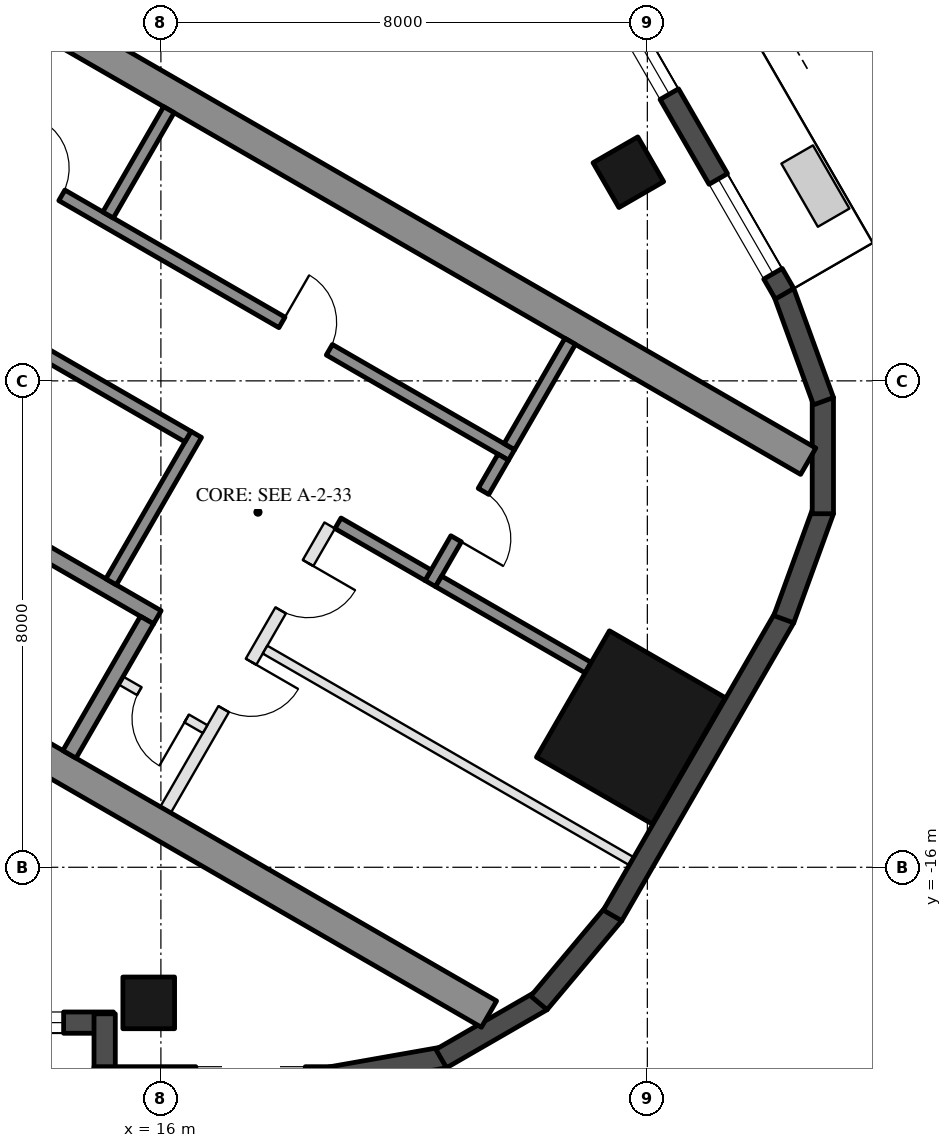
"""IFC4 building model, lengths in metres.
Left out: names, types, materials, properties, quantities, classifications, styles, units other than length and angle.
Written with IfcOpenShell. Run it as: python <this file> out.ifc"""

import sys

from ifc_helpers import new_model, si_unit, direction, frame, frame_2d, origin, origin_2d, place, context, subcontext, project, spatial, rectangle, hollow_rectangle, extrude, element, fill, save


model = new_model("IFC4")
c1 = context("Model", 3, precision=1e-05, world=origin(), true_north=direction((0.0, 1.0)))
c2 = subcontext(c1, "Body", "Model", "MODEL_VIEW")
j1 = project(units=[si_unit("LENGTHUNIT", "METRE"), si_unit("PLANEANGLEUNIT", "RADIAN")], contexts=[c1])
p1 = place(None, origin())
s1 = spatial("IfcSite", under=j1, at=p1, CompositionType="ELEMENT")
p2 = place(p1, origin())
s2 = spatial("IfcBuilding", under=s1, at=p2, CompositionType="ELEMENT")
p3 = place(p2, frame((0.0, 0.0, 146.6)))
s3 = spatial("IfcBuildingStorey", under=s2, at=p3, CompositionType="ELEMENT", Elevation=146.6)
for number, where, z_axis, x_axis in (
    (1, (15.8, -18.23, 0.0), (0.0, 0.0, 1.0), (-1.0, 0.0, 0.0)),
    (2, (23.688, -4.568, 0.0), (0.0, 0.0, 1.0), (-0.5, 0.866, 0.0)),
):
    element("IfcColumn", number, at=place(p3, frame(where, z_axis=z_axis, x_axis=x_axis)), inside=s3, PredefinedType="COLUMN", context=c2, shape_type="SweptSolid", body=[
        extrude(hollow_rectangle(XDim=0.85, YDim=0.85, WallThickness=0.04, at=origin_2d()), origin(), (0.0, 0.0, 1.0), 3.7),
    ])
p4 = place(p3, frame((23.729, -13.7, 0.0), z_axis=(0.0, 0.0, 1.0), x_axis=(0.5, 0.866025403784, 0.0)))
e3 = element("IfcColumn", 3, at=p4, inside=s3, PredefinedType="COLUMN", context=c2, shape_type="SweptSolid", body=[
    extrude(hollow_rectangle(XDim=2.4, YDim=2.2, WallThickness=0.06, at=origin_2d()), origin(), (0.0, 0.0, 1.0), 3.7),
])
p5 = place(p3, frame((8.48, -18.555, 0.0), z_axis=(0.0, 0.0, 1.0), x_axis=(1.0, 0.0, 0.0)))
e4 = element("IfcWall", 4, at=p5, inside=s3, PredefinedType="SOLIDWALL", context=c2, shape_type="SweptSolid", body=[
    extrude(rectangle(XDim=6.74, YDim=0.35, at=frame_2d((3.37, 0.0))), origin(), (0.0, 0.0, 1.0), 3.55),
])
p6 = place(p5, frame((0.32, 0.0, 0.0)))
e5 = element("IfcOpeningElement", 5, at=p6, cuts=e4, PredefinedType="OPENING", context=c2, shape_type="SweptSolid", body=[
    extrude(rectangle(XDim=2.4, YDim=2.4, at=frame_2d((1.2, 1.2))), frame((0.0, 0.185, 0.0), z_axis=(0.0, -1.0, 0.0), x_axis=(1.0, 0.0, 0.0)), (0.0, 0.0, 1.0), 0.37),
])
p7 = place(p5, frame((3.02, 0.0, 0.3)))
e6 = element("IfcOpeningElement", 6, at=p7, cuts=e4, PredefinedType="OPENING", context=c2, shape_type="SweptSolid", body=[
    extrude(rectangle(XDim=2.9, YDim=2.65, at=frame_2d((1.45, 1.325))), frame((0.0, 0.185, 0.0), z_axis=(0.0, -1.0, 0.0), x_axis=(1.0, 0.0, 0.0)), (0.0, 0.0, 1.0), 0.37),
])
p8 = place(p3, frame((15.075, -18.41, 0.0), z_axis=(0.0, 0.0, 1.0), x_axis=(0.0, -1.0, 0.0)))
e7 = element("IfcWall", 7, at=p8, inside=s3, PredefinedType="SOLIDWALL", context=c2, shape_type="SweptSolid", body=[
    extrude(rectangle(XDim=1.22, YDim=0.35, at=frame_2d((0.61, 0.0))), origin(), (0.0, 0.0, 1.0), 3.55),
])
p9 = place(p3, frame((14.9, -19.455, 0.0), z_axis=(0.0, 0.0, 1.0), x_axis=(1.0, 0.0, 0.0)))
e8 = element("IfcWall", 8, at=p9, inside=s3, PredefinedType="SOLIDWALL", context=c2, shape_type="SweptSolid", body=[
    extrude(rectangle(XDim=3.916, YDim=0.35, at=frame_2d((1.958, 0.0))), origin(), (0.0, 0.0, 1.0), 3.55),
])
p10 = place(p9, frame((1.675, 0.0, 0.3)))
e9 = element("IfcOpeningElement", 9, at=p10, cuts=e8, PredefinedType="OPENING", context=c2, shape_type="SweptSolid", body=[
    extrude(rectangle(XDim=1.8, YDim=2.65, at=frame_2d((0.9, 1.325))), frame((0.0, 0.185, 0.0), z_axis=(0.0, -1.0, 0.0), x_axis=(1.0, 0.0, 0.0)), (0.0, 0.0, 1.0), 0.37),
])
p11 = place(p3, frame((18.785, -19.458, 0.0), z_axis=(0.0, 0.0, 1.0), x_axis=(0.984798995425, 0.173697837091, 0.0)))
e10 = element("IfcWall", 10, at=p11, inside=s3, PredefinedType="SOLIDWALL", context=c2, shape_type="SweptSolid", body=[
    extrude(rectangle(XDim=1.91, YDim=0.35, at=frame_2d((0.955, 0.0))), origin(), (0.0, 0.0, 1.0), 3.55),
])
for number, where, z_axis, x_axis in (
    (11, (20.61, -19.147, 0.0), (0.0, 0.0, 1.0), (0.866, 0.5, 0.0)),
    (12, (22.217, -18.231, 0.0), (0.0, 0.0, 1.0), (0.643, 0.766, 0.0)),
):
    element("IfcWall", number, at=place(p3, frame(where, z_axis=z_axis, x_axis=x_axis)), inside=s3, PredefinedType="SOLIDWALL", context=c2, shape_type="SweptSolid", body=[
        extrude(rectangle(XDim=1.91, YDim=0.35, at=frame_2d((0.955, 0.0))), origin(), (0.0, 0.0, 1.0), 3.55),
    ])
p12 = place(p3, frame((23.427, -16.792, 0.0), z_axis=(0.0, 0.0, 1.0), x_axis=(0.500018773155, 0.866014564827, 0.0)))
e13 = element("IfcWall", 13, at=p12, inside=s3, PredefinedType="SOLIDWALL", context=c2, shape_type="SweptSolid", body=[
    extrude(rectangle(XDim=5.658, YDim=0.35, at=frame_2d((2.829, 0.0))), origin(), (0.0, 0.0, 1.0), 3.55),
])
for number, where, z_axis, x_axis in (
    (14, (26.244, -11.92, 0.0), (0.0, 0.0, 1.0), (0.342, 0.94, 0.0)),
    (15, (26.886, -10.185, 0.0), (0.0, 0.0, 1.0), (0.0, 1.0, 0.0)),
    (16, (26.897, -8.335, 0.0), (0.0, 0.0, 1.0), (-0.342, 0.94, 0.0)),
):
    element("IfcWall", number, at=place(p3, frame(where, z_axis=z_axis, x_axis=x_axis)), inside=s3, PredefinedType="SOLIDWALL", context=c2, shape_type="SweptSolid", body=[
        extrude(rectangle(XDim=1.91, YDim=0.35, at=frame_2d((0.955, 0.0))), origin(), (0.0, 0.0, 1.0), 3.55),
    ])
p13 = place(p3, frame((26.257, -6.567, 0.0), z_axis=(0.0, 0.0, 1.0), x_axis=(-0.500023526245, 0.866011820475, 0.0)))
e17 = element("IfcWall", 17, at=p13, inside=s3, PredefinedType="SOLIDWALL", context=c2, shape_type="SweptSolid", body=[
    extrude(rectangle(XDim=11.816, YDim=0.35, at=frame_2d((5.908, 0.0))), origin(), (0.0, 0.0, 1.0), 3.55),
])
p14 = place(p13, frame((0.38, 0.0, 0.3)))
e18 = element("IfcOpeningElement", 18, at=p14, cuts=e17, PredefinedType="OPENING", context=c2, shape_type="SweptSolid", body=[
    extrude(rectangle(XDim=1.8, YDim=2.65, at=frame_2d((0.9, 1.325))), frame((0.0, 0.185, 0.0), z_axis=(0.0, -1.0, 0.0), x_axis=(1.0, 0.0, 0.0)), (0.0, 0.0, 1.0), 0.37),
])
p15 = place(p13, frame((7.741, 0.0, 0.0)))
e19 = element("IfcOpeningElement", 19, at=p15, cuts=e17, PredefinedType="OPENING", context=c2, shape_type="SweptSolid", body=[
    extrude(rectangle(XDim=2.4, YDim=2.4, at=frame_2d((1.2, 1.2))), frame((0.0, 0.185, 0.0), z_axis=(0.0, -1.0, 0.0), x_axis=(1.0, 0.0, 0.0)), (0.0, 0.0, 1.0), 0.37),
])
p16 = place(p13, frame((3.791, 0.0, 0.3)))
e20 = element("IfcOpeningElement", 20, at=p16, cuts=e17, PredefinedType="OPENING", context=c2, shape_type="SweptSolid", body=[
    extrude(rectangle(XDim=1.6, YDim=2.65, at=frame_2d((0.8, 1.325))), frame((0.0, 0.185, 0.0), z_axis=(0.0, -1.0, 0.0), x_axis=(1.0, 0.0, 0.0)), (0.0, 0.0, 1.0), 0.37),
])
p17 = place(p13, frame((5.691, 0.0, 0.3)))
e21 = element("IfcOpeningElement", 21, at=p17, cuts=e17, PredefinedType="OPENING", context=c2, shape_type="SweptSolid", body=[
    extrude(rectangle(XDim=1.6, YDim=2.65, at=frame_2d((0.8, 1.325))), frame((0.0, 0.185, 0.0), z_axis=(0.0, -1.0, 0.0), x_axis=(1.0, 0.0, 0.0)), (0.0, 0.0, 1.0), 0.37),
])
for number, where, z_axis, x_axis in (
    (22, (8.547, -10.997, 0.0), (0.0, 0.0, 1.0), (0.866, -0.5, 0.0)),
    (23, (13.797, -1.903, 0.0), (0.0, 0.0, 1.0), (0.866, -0.5, 0.0)),
):
    element("IfcWall", number, at=place(p3, frame(where, z_axis=z_axis, x_axis=x_axis)), inside=s3, PredefinedType="SHEAR", context=c2, shape_type="SweptSolid", body=[
        extrude(rectangle(XDim=14.837, YDim=0.5, at=frame_2d((7.418, 0.0))), origin(), (0.0, 0.0, 1.0), 3.5),
    ])
p18 = place(p3, frame((10.356, -8.664, 0.0), z_axis=(0.0, 0.0, 1.0), x_axis=(0.866028629588, -0.499994412703, 0.0)))
e24 = element("IfcWall", 24, at=p18, inside=s3, PredefinedType="SHEAR", context=c2, shape_type="SweptSolid", body=[
    extrude(rectangle(XDim=6.45, YDim=0.25, at=frame_2d((3.225, 0.0))), origin(), (0.0, 0.0, 1.0), 3.5),
])
p19 = place(p18, frame((0.3, 0.0, 0.0)))
e25 = element("IfcOpeningElement", 25, at=p19, cuts=e24, PredefinedType="OPENING", context=c2, shape_type="SweptSolid", body=[
    extrude(rectangle(XDim=1.0, YDim=2.1, at=frame_2d((0.5, 1.05))), frame((0.0, 0.135, 0.0), z_axis=(0.0, -1.0, 0.0), x_axis=(1.0, 0.0, 0.0)), (0.0, 0.0, 1.0), 0.27),
])
p20 = place(p3, frame((14.496, -14.143, 0.0), z_axis=(0.0, 0.0, 1.0), x_axis=(0.500062241894, 0.865989465428, 0.0)))
e26 = element("IfcWall", 26, at=p20, inside=s3, PredefinedType="SHEAR", context=c2, shape_type="SweptSolid", body=[
    extrude(rectangle(XDim=2.55, YDim=0.25, at=frame_2d((1.275, 0.0))), origin(), (0.0, 0.0, 1.0), 3.5),
])
p21 = place(p3, frame((15.181, -11.305, 0.0), z_axis=(0.0, 0.0, 1.0), x_axis=(0.49994636267, 0.866056369097, 0.0)))
e27 = element("IfcWall", 27, at=p21, inside=s3, PredefinedType="SHEAR", context=c2, shape_type="SweptSolid", body=[
    extrude(rectangle(XDim=2.8, YDim=0.2, at=frame_2d((1.4, 0.0))), origin(), (0.0, 0.0, 1.0), 3.5),
])
p22 = place(p3, frame((14.02, -7.517, 0.0), z_axis=(0.0, 0.0, 1.0), x_axis=(0.866034573852, -0.49998411664, 0.0)))
e28 = element("IfcWall", 28, at=p22, inside=s3, PredefinedType="SHEAR", context=c2, shape_type="SweptSolid", body=[
    extrude(rectangle(XDim=2.8, YDim=0.2, at=frame_2d((1.4, 0.0))), origin(), (0.0, 0.0, 1.0), 3.5),
])
p23 = place(p3, frame((12.968, -4.138, 0.0), z_axis=(0.0, 0.0, 1.0), x_axis=(0.866028328073, -0.49999493495, 0.0)))
e29 = element("IfcWall", 29, at=p23, inside=s3, PredefinedType="SHEAR", context=c2, shape_type="SweptSolid", body=[
    extrude(rectangle(XDim=10.16, YDim=0.2, at=frame_2d((5.08, 0.0))), origin(), (0.0, 0.0, 1.0), 3.5),
])
p24 = place(p23, frame((0.72, 0.0, 0.0)))
e30 = element("IfcOpeningElement", 30, at=p24, cuts=e29, PredefinedType="OPENING", context=c2, shape_type="SweptSolid", body=[
    extrude(rectangle(XDim=0.9, YDim=2.1, at=frame_2d((0.45, 1.05))), frame((0.0, 0.11, 0.0), z_axis=(0.0, -1.0, 0.0), x_axis=(1.0, 0.0, 0.0)), (0.0, 0.0, 1.0), 0.22),
])
p25 = place(p23, frame((5.8, 0.0, 0.0)))
e31 = element("IfcOpeningElement", 31, at=p25, cuts=e29, PredefinedType="OPENING", context=c2, shape_type="SweptSolid", body=[
    extrude(rectangle(XDim=0.9, YDim=2.1, at=frame_2d((0.45, 1.05))), frame((0.0, 0.11, 0.0), z_axis=(0.0, -1.0, 0.0), x_axis=(1.0, 0.0, 0.0)), (0.0, 0.0, 1.0), 0.22),
])
p26 = place(p3, frame((20.43, -11.333, 0.0), z_axis=(0.0, 0.0, 1.0), x_axis=(0.500001309137, 0.866024647952, 0.0)))
e32 = element("IfcWall", 32, at=p26, inside=s3, PredefinedType="SHEAR", context=c2, shape_type="SweptSolid", body=[
    extrude(rectangle(XDim=2.4, YDim=0.2, at=frame_2d((1.2, 0.0))), origin(), (0.0, 0.0, 1.0), 3.5),
])
p27 = place(p26, frame((0.85, 0.0, 0.0)))
e33 = element("IfcOpeningElement", 33, at=p27, cuts=e32, PredefinedType="OPENING", context=c2, shape_type="SweptSolid", body=[
    extrude(rectangle(XDim=0.9, YDim=2.1, at=frame_2d((0.45, 1.05))), frame((0.0, 0.11, 0.0), z_axis=(0.0, -1.0, 0.0), x_axis=(1.0, 0.0, 0.0)), (0.0, 0.0, 1.0), 0.22),
])
p28 = place(p3, frame((18.913, -10.342, 0.0), z_axis=(0.0, 0.0, 1.0), x_axis=(0.866038183914, -0.499977863513, 0.0)))
e34 = element("IfcWall", 34, at=p28, inside=s3, PredefinedType="SHEAR", context=c2, shape_type="SweptSolid", body=[
    extrude(rectangle(XDim=1.71, YDim=0.2, at=frame_2d((0.855, 0.0))), origin(), (0.0, 0.0, 1.0), 3.5),
])
for number, where, z_axis, x_axis in (
    (35, (15.131, -5.272, 0.0), (0.0, 0.0, 1.0), (0.5, 0.866, 0.0)),
    (36, (21.73, -9.082, 0.0), (0.0, 0.0, 1.0), (0.5, 0.866, 0.0)),
):
    element("IfcWall", number, at=place(p3, frame(where, z_axis=z_axis, x_axis=x_axis)), inside=s3, PredefinedType="SHEAR", context=c2, shape_type="SweptSolid", body=[
        extrude(rectangle(XDim=2.0, YDim=0.2, at=frame_2d((1.0, 0.0))), origin(), (0.0, 0.0, 1.0), 3.5),
    ])
p29 = place(p3, frame((20.567, -11.297, 0.0), z_axis=(0.0, 0.0, 1.0), x_axis=(0.866055327414, -0.49994816717, 0.0)))
e37 = element("IfcWall", 37, at=p29, inside=s3, PredefinedType="SHEAR", context=c2, shape_type="SweptSolid", body=[
    extrude(rectangle(XDim=2.84, YDim=0.2, at=frame_2d((1.42, 0.0))), origin(), (0.0, 0.0, 1.0), 3.5),
])
p30 = place(p3, frame((16.076, -15.055, 0.0), z_axis=(0.0, 0.0, 1.0), x_axis=(0.499995103361, 0.866028230842, 0.0)))
e38 = element("IfcWall", 38, at=p30, inside=s3, PredefinedType="PARTITIONING", context=c2, shape_type="SweptSolid", body=[
    extrude(rectangle(XDim=5.4, YDim=0.2, at=frame_2d((2.7, 0.0))), origin(), (0.0, 0.0, 1.0), 3.5),
])
p31 = place(p30, frame((1.913, 0.0, 0.0)))
e39 = element("IfcOpeningElement", 39, at=p31, cuts=e38, PredefinedType="OPENING", context=c2, shape_type="SweptSolid", body=[
    extrude(rectangle(XDim=0.9, YDim=2.1, at=frame_2d((0.45, 1.05))), frame((0.0, 0.11, 0.0), z_axis=(0.0, -1.0, 0.0), x_axis=(1.0, 0.0, 0.0)), (0.0, 0.0, 1.0), 0.22),
])
p32 = place(p30, frame((3.788, 0.0, 0.0)))
e40 = element("IfcOpeningElement", 40, at=p32, cuts=e38, PredefinedType="OPENING", context=c2, shape_type="SweptSolid", body=[
    extrude(rectangle(XDim=0.9, YDim=2.1, at=frame_2d((0.45, 1.05))), frame((0.0, 0.11, 0.0), z_axis=(0.0, -1.0, 0.0), x_axis=(1.0, 0.0, 0.0)), (0.0, 0.0, 1.0), 0.22),
])
p33 = place(p3, frame((15.342, -12.928, 0.0), z_axis=(0.0, 0.0, 1.0), x_axis=(0.865989903783, -0.500061482766, 0.0)))
e41 = element("IfcWall", 41, at=p33, inside=s3, PredefinedType="PARTITIONING", context=c2, shape_type="SweptSolid", body=[
    extrude(rectangle(XDim=1.6, YDim=0.15, at=frame_2d((0.8, 0.0))), origin(), (0.0, 0.0, 1.0), 3.5),
])
p34 = place(p33, frame((0.35, 0.0, 0.0)))
e42 = element("IfcOpeningElement", 42, at=p34, cuts=e41, PredefinedType="OPENING", context=c2, shape_type="SweptSolid", body=[
    extrude(rectangle(XDim=0.9, YDim=2.1, at=frame_2d((0.45, 1.05))), frame((0.0, 0.085, 0.0), z_axis=(0.0, -1.0, 0.0), x_axis=(1.0, 0.0, 0.0)), (0.0, 0.0, 1.0), 0.17),
])
p35 = place(p3, frame((17.713, -12.42, 0.0), z_axis=(0.0, 0.0, 1.0), x_axis=(0.866016523273, -0.500015381182, 0.0)))
e43 = element("IfcWall", 43, at=p35, inside=s3, PredefinedType="PARTITIONING", context=c2, shape_type="SweptSolid", body=[
    extrude(rectangle(XDim=6.95, YDim=0.15, at=frame_2d((3.475, 0.0))), origin(), (0.0, 0.0, 1.0), 3.5),
])
p36 = place(p7, origin())
e44 = element("IfcWindow", 44, at=p36, inside=s3, PartitioningType="SINGLE_PANEL", PredefinedType="WINDOW", context=c2, shape_type="SweptSolid", body=[
    extrude(rectangle(XDim=2.9, YDim=2.65, at=frame_2d((1.45, 1.325))), frame((0.0, 0.03, 0.0), z_axis=(0.0, -1.0, 0.0), x_axis=(1.0, 0.0, 0.0)), (0.0, 0.0, 1.0), 0.06),
])
fill(e6, e44)
p37 = place(p14, origin())
e45 = element("IfcWindow", 45, at=p37, inside=s3, PartitioningType="SINGLE_PANEL", PredefinedType="WINDOW", context=c2, shape_type="SweptSolid", body=[
    extrude(rectangle(XDim=1.8, YDim=2.65, at=frame_2d((0.9, 1.325))), frame((0.0, 0.03, 0.0), z_axis=(0.0, -1.0, 0.0), x_axis=(1.0, 0.0, 0.0)), (0.0, 0.0, 1.0), 0.06),
])
fill(e18, e45)
p38 = place(p16, origin())
e46 = element("IfcWindow", 46, at=p38, inside=s3, PartitioningType="SINGLE_PANEL", PredefinedType="WINDOW", context=c2, shape_type="SweptSolid", body=[
    extrude(rectangle(XDim=1.6, YDim=2.65, at=frame_2d((0.8, 1.325))), frame((0.0, 0.03, 0.0), z_axis=(0.0, -1.0, 0.0), x_axis=(1.0, 0.0, 0.0)), (0.0, 0.0, 1.0), 0.06),
])
fill(e20, e46)
p39 = place(p34, frame((0.9, 0.0, 0.0), z_axis=(0.0, 0.0, 1.0), x_axis=(-1.0, 0.0, 0.0)))
e47 = element("IfcDoor", 47, at=p39, inside=s3, OperationType="SINGLE_SWING_LEFT", PredefinedType="DOOR", context=c2, shape_type="SweptSolid", body=[
    extrude(rectangle(XDim=0.9, YDim=2.1, at=frame_2d((0.45, 1.05))), frame((0.0, 0.025, 0.0), z_axis=(0.0, -1.0, 0.0), x_axis=(1.0, 0.0, 0.0)), (0.0, 0.0, 1.0), 0.05),
])
fill(e42, e47)
p40 = place(p24, origin())
e48 = element("IfcDoor", 48, at=p40, inside=s3, OperationType="SINGLE_SWING_LEFT", PredefinedType="DOOR", context=c2, shape_type="SweptSolid", body=[
    extrude(rectangle(XDim=0.9, YDim=2.1, at=frame_2d((0.45, 1.05))), frame((0.0, 0.025, 0.0), z_axis=(0.0, -1.0, 0.0), x_axis=(1.0, 0.0, 0.0)), (0.0, 0.0, 1.0), 0.05),
])
fill(e30, e48)
p41 = place(p25, origin())
e49 = element("IfcDoor", 49, at=p41, inside=s3, OperationType="SINGLE_SWING_LEFT", PredefinedType="DOOR", context=c2, shape_type="SweptSolid", body=[
    extrude(rectangle(XDim=0.9, YDim=2.1, at=frame_2d((0.45, 1.05))), frame((0.0, 0.025, 0.0), z_axis=(0.0, -1.0, 0.0), x_axis=(1.0, 0.0, 0.0)), (0.0, 0.0, 1.0), 0.05),
])
fill(e31, e49)
p42 = place(p27, frame((0.9, 0.0, 0.0), z_axis=(0.0, 0.0, 1.0), x_axis=(-1.0, 0.0, 0.0)))
e50 = element("IfcDoor", 50, at=p42, inside=s3, OperationType="SINGLE_SWING_RIGHT", PredefinedType="DOOR", context=c2, shape_type="SweptSolid", body=[
    extrude(rectangle(XDim=0.9, YDim=2.1, at=frame_2d((0.45, 1.05))), frame((0.0, 0.025, 0.0), z_axis=(0.0, -1.0, 0.0), x_axis=(1.0, 0.0, 0.0)), (0.0, 0.0, 1.0), 0.05),
])
fill(e33, e50)
p43 = place(p31, frame((0.9, 0.0, 0.0), z_axis=(0.0, 0.0, 1.0), x_axis=(-1.0, 0.0, 0.0)))
e51 = element("IfcDoor", 51, at=p43, inside=s3, OperationType="SINGLE_SWING_LEFT", PredefinedType="DOOR", context=c2, shape_type="SweptSolid", body=[
    extrude(rectangle(XDim=0.9, YDim=2.1, at=frame_2d((0.45, 1.05))), frame((0.0, 0.025, 0.0), z_axis=(0.0, -1.0, 0.0), x_axis=(1.0, 0.0, 0.0)), (0.0, 0.0, 1.0), 0.05),
])
fill(e39, e51)
p44 = place(p32, frame((0.9, 0.0, 0.0), z_axis=(0.0, 0.0, 1.0), x_axis=(-1.0, 0.0, 0.0)))
e52 = element("IfcDoor", 52, at=p44, inside=s3, OperationType="SINGLE_SWING_LEFT", PredefinedType="DOOR", context=c2, shape_type="SweptSolid", body=[
    extrude(rectangle(XDim=0.9, YDim=2.1, at=frame_2d((0.45, 1.05))), frame((0.0, 0.025, 0.0), z_axis=(0.0, -1.0, 0.0), x_axis=(1.0, 0.0, 0.0)), (0.0, 0.0, 1.0), 0.05),
])
fill(e40, e52)
save(model, sys.argv[1])
